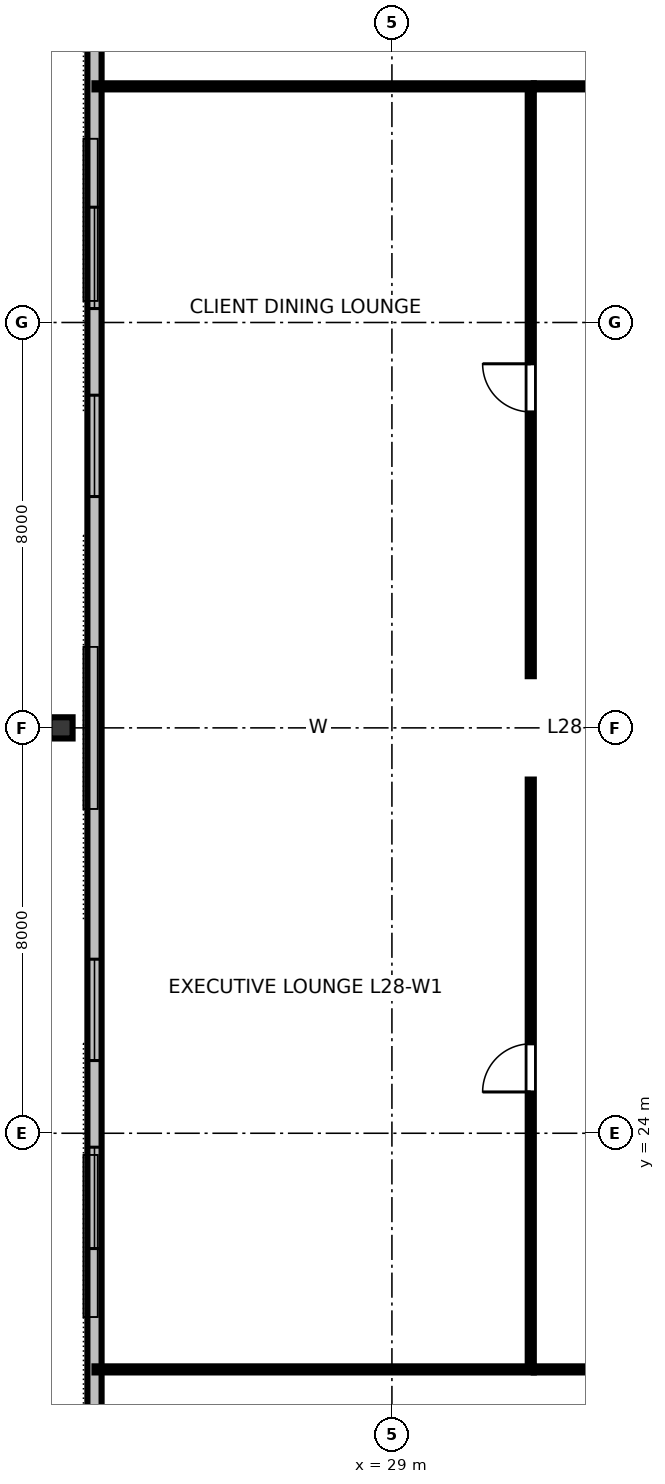
"""IFC4 building model, lengths in metres.
Left out: names, types, materials, properties, quantities, classifications, styles, units other than length and angle.
Written with IfcOpenShell. Run it as: python <this file> out.ifc"""

import sys

from ifc_helpers import new_model, si_unit, direction, frame, frame_2d, origin, origin_2d, place, context, subcontext, project, spatial, rectangle, i_section, extrude, element, fill, save


model = new_model("IFC4")
c1 = context("Model", 3, precision=1e-05, world=origin(), true_north=direction((0.0, 1.0)))
c2 = subcontext(c1, "Body", "Model", "MODEL_VIEW")
j1 = project(units=[si_unit("LENGTHUNIT", "METRE"), si_unit("PLANEANGLEUNIT", "RADIAN")], contexts=[c1])
p1 = place(None, origin())
s1 = spatial("IfcSite", under=j1, at=p1, CompositionType="ELEMENT")
p2 = place(p1, origin())
s2 = spatial("IfcBuilding", under=s1, at=p2, CompositionType="ELEMENT")
p3 = place(p2, frame((0.0, 0.0, 109.6)))
s3 = spatial("IfcBuildingStorey", under=s2, at=p3, CompositionType="ELEMENT", Elevation=109.6)
p4 = place(p3, frame((22.47, 32.0, 0.0), z_axis=(0.0, 0.0, 1.0), x_axis=(0.0, 1.0, 0.0)))
e1 = element("IfcColumn", 1, at=p4, inside=s3, PredefinedType="COLUMN", context=c2, shape_type="SweptSolid", body=[
    extrude(i_section(OverallWidth=0.418, OverallDepth=0.455, WebThickness=0.042, FlangeThickness=0.068, FilletRadius=0.025, at=origin_2d()), origin(), (0.0, 0.0, 1.0), 3.358),
])
p5 = place(p3, frame((23.13, 47.94, 0.0), z_axis=(0.0, 0.0, 1.0), x_axis=(0.0, -1.0, 0.0)))
e2 = element("IfcWall", 2, at=p5, inside=s3, PredefinedType="STANDARD", context=c2, shape_type="SweptSolid", body=[
    extrude(rectangle(XDim=31.88, YDim=0.28, at=frame_2d((15.94, 0.0))), origin(), (0.0, 0.0, 1.0), 3.36),
])
p6 = place(p5, frame((5.665, 0.0, 0.8)))
e3 = element("IfcOpeningElement", 3, at=p6, cuts=e2, PredefinedType="OPENING", context=c2, shape_type="SweptSolid", body=[
    extrude(rectangle(XDim=2.0, YDim=1.95, at=frame_2d((1.0, 0.975))), frame((0.0, 0.15, 0.0), z_axis=(0.0, -1.0, 0.0), x_axis=(1.0, 0.0, 0.0)), (0.0, 0.0, 1.0), 0.3),
])
p7 = place(p5, frame((9.375, 0.0, 0.8)))
e4 = element("IfcOpeningElement", 4, at=p7, cuts=e2, PredefinedType="OPENING", context=c2, shape_type="SweptSolid", body=[
    extrude(rectangle(XDim=2.0, YDim=1.95, at=frame_2d((1.0, 0.975))), frame((0.0, 0.15, 0.0), z_axis=(0.0, -1.0, 0.0), x_axis=(1.0, 0.0, 0.0)), (0.0, 0.0, 1.0), 0.3),
])
p8 = place(p5, frame((20.505, 0.0, 0.8)))
e5 = element("IfcOpeningElement", 5, at=p8, cuts=e2, PredefinedType="OPENING", context=c2, shape_type="SweptSolid", body=[
    extrude(rectangle(XDim=2.0, YDim=1.95, at=frame_2d((1.0, 0.975))), frame((0.0, 0.15, 0.0), z_axis=(0.0, -1.0, 0.0), x_axis=(1.0, 0.0, 0.0)), (0.0, 0.0, 1.0), 0.3),
])
p9 = place(p5, frame((24.215, 0.0, 0.8)))
e6 = element("IfcOpeningElement", 6, at=p9, cuts=e2, PredefinedType="OPENING", context=c2, shape_type="SweptSolid", body=[
    extrude(rectangle(XDim=2.0, YDim=1.95, at=frame_2d((1.0, 0.975))), frame((0.0, 0.15, 0.0), z_axis=(0.0, -1.0, 0.0), x_axis=(1.0, 0.0, 0.0)), (0.0, 0.0, 1.0), 0.3),
])
p10 = place(p3, frame((31.8, 19.34, 0.0), z_axis=(0.0, 0.0, 1.0), x_axis=(1.0, 0.0, 0.0)))
e7 = element("IfcWall", 7, at=p10, inside=s3, PredefinedType="PARTITIONING", context=c2, shape_type="SweptSolid", body=[
    extrude(rectangle(XDim=28.4, YDim=0.12, at=frame_2d((14.2, 0.0))), origin(), (0.0, 0.0, 1.0), 2.64),
])
p11 = place(p10, frame((3.152, 0.0, 0.0)))
e8 = element("IfcOpeningElement", 8, at=p11, cuts=e7, PredefinedType="OPENING", context=c2, shape_type="SweptSolid", body=[
    extrude(rectangle(XDim=0.95, YDim=2.15, at=frame_2d((0.475, 1.075))), frame((0.0, 0.07, 0.0), z_axis=(0.0, -1.0, 0.0), x_axis=(1.0, 0.0, 0.0)), (0.0, 0.0, 1.0), 0.14),
])
p12 = place(p10, frame((10.136, 0.0, 0.0)))
e9 = element("IfcOpeningElement", 9, at=p12, cuts=e7, PredefinedType="OPENING", context=c2, shape_type="SweptSolid", body=[
    extrude(rectangle(XDim=0.95, YDim=2.15, at=frame_2d((0.475, 1.075))), frame((0.0, 0.07, 0.0), z_axis=(0.0, -1.0, 0.0), x_axis=(1.0, 0.0, 0.0)), (0.0, 0.0, 1.0), 0.14),
])
p13 = place(p10, frame((15.813, 0.0, 0.0)))
e10 = element("IfcOpeningElement", 10, at=p13, cuts=e7, PredefinedType="OPENING", context=c2, shape_type="SweptSolid", body=[
    extrude(rectangle(XDim=0.95, YDim=2.15, at=frame_2d((0.475, 1.075))), frame((0.0, 0.07, 0.0), z_axis=(0.0, -1.0, 0.0), x_axis=(1.0, 0.0, 0.0)), (0.0, 0.0, 1.0), 0.14),
])
p14 = place(p10, frame((22.888, 0.0, 0.0)))
e11 = element("IfcOpeningElement", 11, at=p14, cuts=e7, PredefinedType="OPENING", context=c2, shape_type="SweptSolid", body=[
    extrude(rectangle(XDim=0.95, YDim=2.15, at=frame_2d((0.475, 1.075))), frame((0.0, 0.07, 0.0), z_axis=(0.0, -1.0, 0.0), x_axis=(1.0, 0.0, 0.0)), (0.0, 0.0, 1.0), 0.14),
])
p15 = place(p3, frame((31.8, 44.66, 0.0), z_axis=(0.0, 0.0, 1.0), x_axis=(1.0, 0.0, 0.0)))
e12 = element("IfcWall", 12, at=p15, inside=s3, PredefinedType="PARTITIONING", context=c2, shape_type="SweptSolid", body=[
    extrude(rectangle(XDim=28.4, YDim=0.12, at=frame_2d((14.2, 0.0))), origin(), (0.0, 0.0, 1.0), 2.64),
])
p16 = place(p15, frame((3.328, 0.0, 0.0)))
e13 = element("IfcOpeningElement", 13, at=p16, cuts=e12, PredefinedType="OPENING", context=c2, shape_type="SweptSolid", body=[
    extrude(rectangle(XDim=0.95, YDim=2.15, at=frame_2d((0.475, 1.075))), frame((0.0, 0.07, 0.0), z_axis=(0.0, -1.0, 0.0), x_axis=(1.0, 0.0, 0.0)), (0.0, 0.0, 1.0), 0.14),
])
p17 = place(p15, frame((8.901, 0.0, 0.0)))
e14 = element("IfcOpeningElement", 14, at=p17, cuts=e12, PredefinedType="OPENING", context=c2, shape_type="SweptSolid", body=[
    extrude(rectangle(XDim=0.95, YDim=2.15, at=frame_2d((0.475, 1.075))), frame((0.0, 0.07, 0.0), z_axis=(0.0, -1.0, 0.0), x_axis=(1.0, 0.0, 0.0)), (0.0, 0.0, 1.0), 0.14),
])
p18 = place(p15, frame((14.127, 0.0, 0.0)))
e15 = element("IfcOpeningElement", 15, at=p18, cuts=e12, PredefinedType="OPENING", context=c2, shape_type="SweptSolid", body=[
    extrude(rectangle(XDim=0.95, YDim=2.15, at=frame_2d((0.475, 1.075))), frame((0.0, 0.07, 0.0), z_axis=(0.0, -1.0, 0.0), x_axis=(1.0, 0.0, 0.0)), (0.0, 0.0, 1.0), 0.14),
])
p19 = place(p15, frame((19.537, 0.0, 0.0)))
e16 = element("IfcOpeningElement", 16, at=p19, cuts=e12, PredefinedType="OPENING", context=c2, shape_type="SweptSolid", body=[
    extrude(rectangle(XDim=0.95, YDim=2.15, at=frame_2d((0.475, 1.075))), frame((0.0, 0.07, 0.0), z_axis=(0.0, -1.0, 0.0), x_axis=(1.0, 0.0, 0.0)), (0.0, 0.0, 1.0), 0.14),
])
p20 = place(p15, frame((24.708, 0.0, 0.0)))
e17 = element("IfcOpeningElement", 17, at=p20, cuts=e12, PredefinedType="OPENING", context=c2, shape_type="SweptSolid", body=[
    extrude(rectangle(XDim=0.95, YDim=2.15, at=frame_2d((0.475, 1.075))), frame((0.0, 0.07, 0.0), z_axis=(0.0, -1.0, 0.0), x_axis=(1.0, 0.0, 0.0)), (0.0, 0.0, 1.0), 0.14),
])
p21 = place(p3, frame((31.74, 19.4, 0.0), z_axis=(0.0, 0.0, 1.0), x_axis=(0.0, 1.0, 0.0)))
e18 = element("IfcWall", 18, at=p21, inside=s3, PredefinedType="PARTITIONING", context=c2, shape_type="SweptSolid", body=[
    extrude(rectangle(XDim=11.58, YDim=0.12, at=frame_2d((5.79, 0.0))), origin(), (0.0, 0.0, 1.0), 2.64),
])
p22 = place(p21, frame((5.415, 0.0, 0.0)))
e19 = element("IfcOpeningElement", 19, at=p22, cuts=e18, PredefinedType="OPENING", context=c2, shape_type="SweptSolid", body=[
    extrude(rectangle(XDim=0.95, YDim=2.15, at=frame_2d((0.475, 1.075))), frame((0.0, 0.07, 0.0), z_axis=(0.0, -1.0, 0.0), x_axis=(1.0, 0.0, 0.0)), (0.0, 0.0, 1.0), 0.14),
])
p23 = place(p3, frame((31.74, 33.02, 0.0), z_axis=(0.0, 0.0, 1.0), x_axis=(0.0, 1.0, 0.0)))
e20 = element("IfcWall", 20, at=p23, inside=s3, PredefinedType="PARTITIONING", context=c2, shape_type="SweptSolid", body=[
    extrude(rectangle(XDim=11.58, YDim=0.12, at=frame_2d((5.79, 0.0))), origin(), (0.0, 0.0, 1.0), 2.64),
])
p24 = place(p23, frame((5.215, 0.0, 0.0)))
e21 = element("IfcOpeningElement", 21, at=p24, cuts=e20, PredefinedType="OPENING", context=c2, shape_type="SweptSolid", body=[
    extrude(rectangle(XDim=0.95, YDim=2.15, at=frame_2d((0.475, 1.075))), frame((0.0, 0.07, 0.0), z_axis=(0.0, -1.0, 0.0), x_axis=(1.0, 0.0, 0.0)), (0.0, 0.0, 1.0), 0.14),
])
for number, where, z_axis, x_axis in (
    (22, (31.8, 19.34, 0.0), (0.0, 0.0, 1.0), (-1.0, 0.0, 0.0)),
    (23, (31.8, 44.66, 0.0), (0.0, 0.0, 1.0), (-1.0, 0.0, 0.0)),
):
    element("IfcWall", number, at=place(p3, frame(where, z_axis=z_axis, x_axis=x_axis)), inside=s3, PredefinedType="PARTITIONING", context=c2, shape_type="SweptSolid", body=[
        extrude(rectangle(XDim=8.67, YDim=0.12, at=frame_2d((4.335, 0.0))), origin(), (0.0, 0.0, 1.0), 2.64),
    ])
p25 = place(p6, origin())
e24 = element("IfcWindow", 24, at=p25, inside=s3, PartitioningType="SINGLE_PANEL", PredefinedType="WINDOW", context=c2, shape_type="SweptSolid", body=[
    extrude(rectangle(XDim=2.0, YDim=1.95, at=frame_2d((1.0, 0.975))), frame((0.0, 0.03, 0.0), z_axis=(0.0, -1.0, 0.0), x_axis=(1.0, 0.0, 0.0)), (0.0, 0.0, 1.0), 0.06),
])
fill(e3, e24)
p26 = place(p7, origin())
e25 = element("IfcWindow", 25, at=p26, inside=s3, PartitioningType="SINGLE_PANEL", PredefinedType="WINDOW", context=c2, shape_type="SweptSolid", body=[
    extrude(rectangle(XDim=2.0, YDim=1.95, at=frame_2d((1.0, 0.975))), frame((0.0, 0.03, 0.0), z_axis=(0.0, -1.0, 0.0), x_axis=(1.0, 0.0, 0.0)), (0.0, 0.0, 1.0), 0.06),
])
fill(e4, e25)
p27 = place(p8, origin())
e26 = element("IfcWindow", 26, at=p27, inside=s3, PartitioningType="SINGLE_PANEL", PredefinedType="WINDOW", context=c2, shape_type="SweptSolid", body=[
    extrude(rectangle(XDim=2.0, YDim=1.95, at=frame_2d((1.0, 0.975))), frame((0.0, 0.03, 0.0), z_axis=(0.0, -1.0, 0.0), x_axis=(1.0, 0.0, 0.0)), (0.0, 0.0, 1.0), 0.06),
])
fill(e5, e26)
p28 = place(p9, origin())
e27 = element("IfcWindow", 27, at=p28, inside=s3, PartitioningType="SINGLE_PANEL", PredefinedType="WINDOW", context=c2, shape_type="SweptSolid", body=[
    extrude(rectangle(XDim=2.0, YDim=1.95, at=frame_2d((1.0, 0.975))), frame((0.0, 0.03, 0.0), z_axis=(0.0, -1.0, 0.0), x_axis=(1.0, 0.0, 0.0)), (0.0, 0.0, 1.0), 0.06),
])
fill(e6, e27)
p29 = place(p22, origin())
e28 = element("IfcDoor", 28, at=p29, inside=s3, OperationType="SINGLE_SWING_LEFT", PredefinedType="DOOR", context=c2, shape_type="SweptSolid", body=[
    extrude(rectangle(XDim=0.95, YDim=2.15, at=frame_2d((0.475, 1.075))), frame((0.0, 0.025, 0.0), z_axis=(0.0, -1.0, 0.0), x_axis=(1.0, 0.0, 0.0)), (0.0, 0.0, 1.0), 0.05),
])
fill(e19, e28)
p30 = place(p24, origin())
e29 = element("IfcDoor", 29, at=p30, inside=s3, OperationType="SINGLE_SWING_RIGHT", PredefinedType="DOOR", context=c2, shape_type="SweptSolid", body=[
    extrude(rectangle(XDim=0.95, YDim=2.15, at=frame_2d((0.475, 1.075))), frame((0.0, 0.025, 0.0), z_axis=(0.0, -1.0, 0.0), x_axis=(1.0, 0.0, 0.0)), (0.0, 0.0, 1.0), 0.05),
])
fill(e21, e29)
save(model, sys.argv[1])
